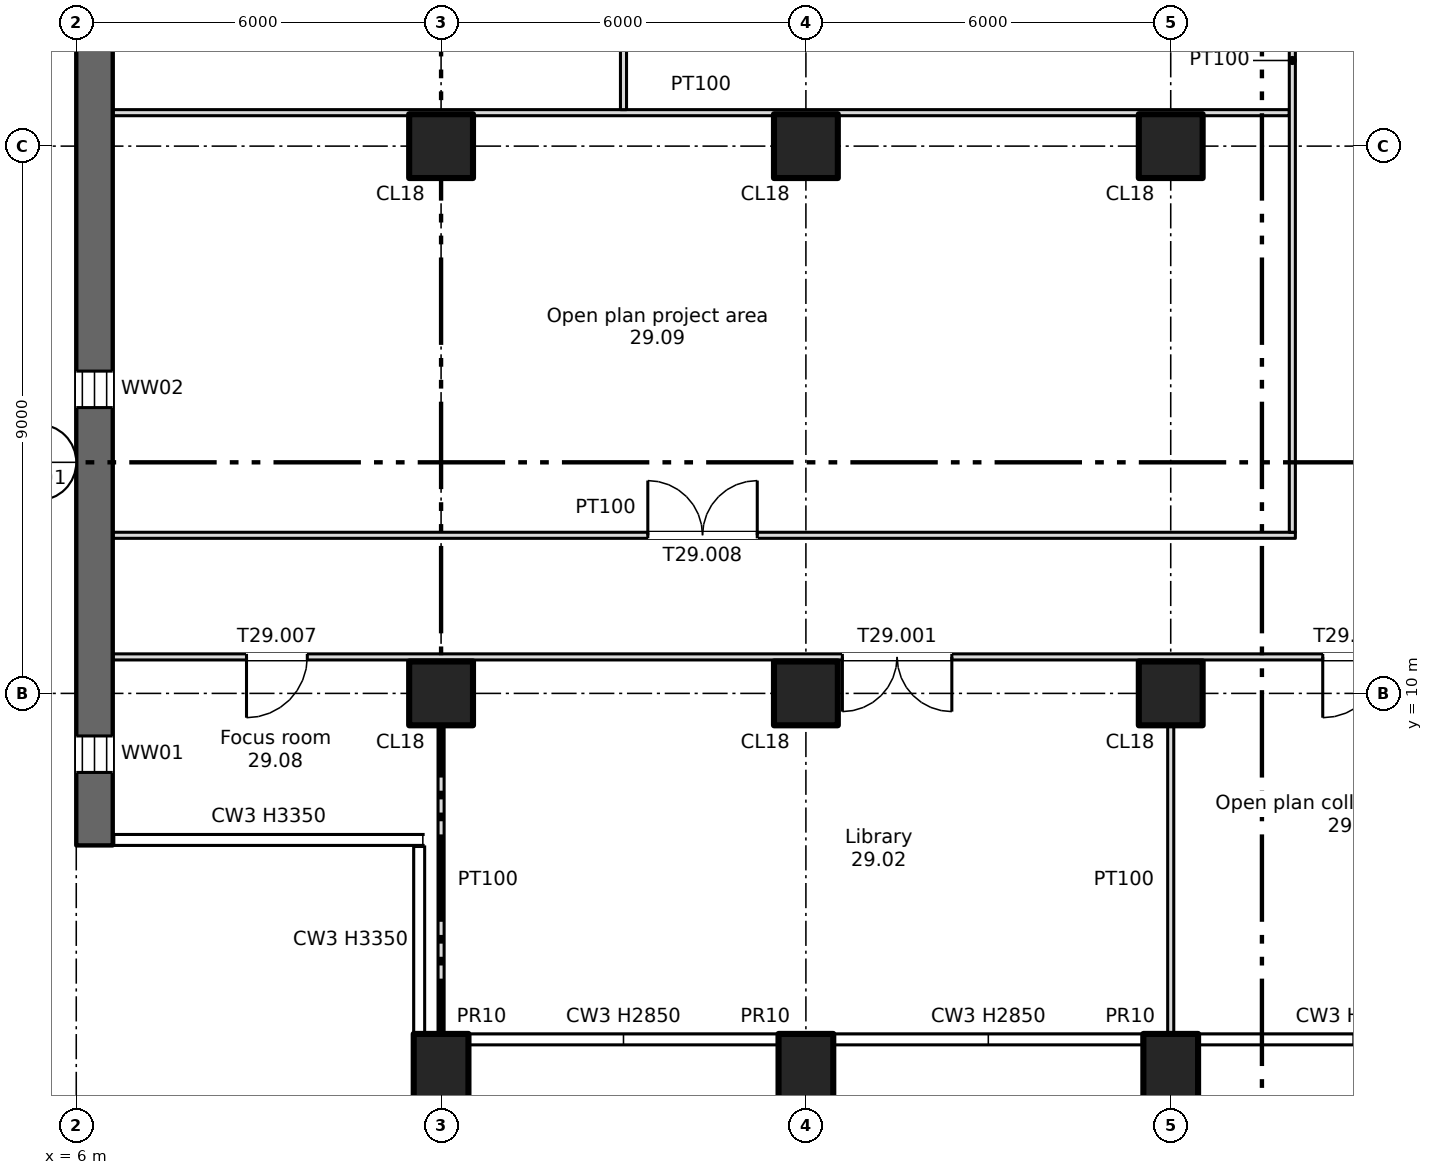
"""IFC4 building model, lengths in metres.
Left out: names, types, materials, properties, quantities, classifications, styles, units other than length and angle.
Written with IfcOpenShell. Run it as: python <this file> out.ifc"""

import sys

from ifc_helpers import new_model, si_unit, direction, frame, frame_2d, origin, origin_2d, place, context, subcontext, project, spatial, rectangle, extrude, element, fill, save


model = new_model("IFC4")
c1 = context("Model", 3, precision=1e-05, world=origin(), true_north=direction((0.0, 1.0)))
c2 = subcontext(c1, "Body", "Model", "MODEL_VIEW")
j1 = project(units=[si_unit("LENGTHUNIT", "METRE"), si_unit("PLANEANGLEUNIT", "RADIAN")], contexts=[c1])
p1 = place(None, origin())
s1 = spatial("IfcSite", under=j1, at=p1, CompositionType="ELEMENT")
p2 = place(p1, origin())
s2 = spatial("IfcBuilding", under=s1, at=p2, CompositionType="ELEMENT")
p3 = place(p2, frame((0.0, 0.0, 200.5)))
s3 = spatial("IfcBuildingStorey", under=s2, at=p3, CompositionType="ELEMENT", Elevation=200.5)
for number, where, z_axis, x_axis in (
    (1, (12.0, 3.7, -0.4), (0.0, 0.0, 1.0), (1.0, 0.0, 0.0)),
    (2, (18.0, 3.7, -0.4), (0.0, 0.0, 1.0), (1.0, 0.0, 0.0)),
    (3, (24.0, 3.7, -0.4), (0.0, 0.0, 1.0), (1.0, 0.0, 0.0)),
):
    element("IfcColumn", number, at=place(p3, frame(where, z_axis=z_axis, x_axis=x_axis)), inside=s3, PredefinedType="COLUMN", context=c2, shape_type="SweptSolid", body=[
        extrude(rectangle(XDim=0.9, YDim=1.4, at=origin_2d()), origin(), (0.0, 0.0, 1.0), 3.75),
    ])
for number, where, z_axis, x_axis in (
    (4, (12.0, 10.0, 0.0), (0.0, 0.0, 1.0), (1.0, 0.0, 0.0)),
    (5, (12.0, 19.0, 0.0), (0.0, 0.0, 1.0), (1.0, 0.0, 0.0)),
    (6, (18.0, 10.0, 0.0), (0.0, 0.0, 1.0), (1.0, 0.0, 0.0)),
    (7, (18.0, 19.0, 0.0), (0.0, 0.0, 1.0), (1.0, 0.0, 0.0)),
    (8, (24.0, 10.0, 0.0), (0.0, 0.0, 1.0), (1.0, 0.0, 0.0)),
    (9, (24.0, 19.0, 0.0), (0.0, 0.0, 1.0), (1.0, 0.0, 0.0)),
):
    element("IfcColumn", number, at=place(p3, frame(where, z_axis=z_axis, x_axis=x_axis)), inside=s3, PredefinedType="COLUMN", context=c2, shape_type="SweptSolid", body=[
        extrude(rectangle(XDim=1.05, YDim=1.05, at=origin_2d()), origin(), (0.0, 0.0, 1.0), 3.35),
    ])
p4 = place(p3, frame((6.3, 7.5, 0.0), z_axis=(0.0, 0.0, 1.0), x_axis=(0.0, 1.0, 0.0)))
e10 = element("IfcWall", 10, at=p4, inside=s3, PredefinedType="SHEAR", context=c2, shape_type="SweptSolid", body=[
    extrude(rectangle(XDim=34.0, YDim=0.6, at=frame_2d((17.0, 0.0))), origin(), (0.0, 0.0, 1.0), 3.35),
])
p5 = place(p4, frame((1.2, 0.0, 0.6)))
e11 = element("IfcOpeningElement", 11, at=p5, cuts=e10, PredefinedType="OPENING", context=c2, shape_type="SweptSolid", body=[
    extrude(rectangle(XDim=0.6, YDim=2.4, at=frame_2d((0.3, 1.2))), frame((0.0, 0.31, 0.0), z_axis=(0.0, -1.0, 0.0), x_axis=(1.0, 0.0, 0.0)), (0.0, 0.0, 1.0), 0.62),
])
p6 = place(p4, frame((7.2, 0.0, 0.6)))
e12 = element("IfcOpeningElement", 12, at=p6, cuts=e10, PredefinedType="OPENING", context=c2, shape_type="SweptSolid", body=[
    extrude(rectangle(XDim=0.6, YDim=2.4, at=frame_2d((0.3, 1.2))), frame((0.0, 0.31, 0.0), z_axis=(0.0, -1.0, 0.0), x_axis=(1.0, 0.0, 0.0)), (0.0, 0.0, 1.0), 0.62),
])
p7 = place(p4, frame((13.2, 0.0, 0.6)))
e13 = element("IfcOpeningElement", 13, at=p7, cuts=e10, PredefinedType="OPENING", context=c2, shape_type="SweptSolid", body=[
    extrude(rectangle(XDim=0.6, YDim=2.4, at=frame_2d((0.3, 1.2))), frame((0.0, 0.31, 0.0), z_axis=(0.0, -1.0, 0.0), x_axis=(1.0, 0.0, 0.0)), (0.0, 0.0, 1.0), 0.62),
])
p8 = place(p4, frame((19.2, 0.0, 0.6)))
e14 = element("IfcOpeningElement", 14, at=p8, cuts=e10, PredefinedType="OPENING", context=c2, shape_type="SweptSolid", body=[
    extrude(rectangle(XDim=0.6, YDim=2.4, at=frame_2d((0.3, 1.2))), frame((0.0, 0.31, 0.0), z_axis=(0.0, -1.0, 0.0), x_axis=(1.0, 0.0, 0.0)), (0.0, 0.0, 1.0), 0.62),
])
p9 = place(p3, frame((6.6, 10.6, 0.0), z_axis=(0.0, 0.0, 1.0), x_axis=(1.0, 0.0, 0.0)))
e15 = element("IfcWall", 15, at=p9, inside=s3, PredefinedType="PARTITIONING", context=c2, shape_type="SweptSolid", body=[
    extrude(rectangle(XDim=64.8, YDim=0.1, at=frame_2d((32.4, 0.0))), origin(), (0.0, 0.0, 1.0), 3.35),
])
p10 = place(p9, frame((12.0, 0.0, 0.0)))
e16 = element("IfcOpeningElement", 16, at=p10, cuts=e15, PredefinedType="OPENING", context=c2, shape_type="SweptSolid", body=[
    extrude(rectangle(XDim=1.8, YDim=2.1, at=frame_2d((0.9, 1.05))), frame((0.0, 0.06, 0.0), z_axis=(0.0, -1.0, 0.0), x_axis=(1.0, 0.0, 0.0)), (0.0, 0.0, 1.0), 0.12),
])
p11 = place(p9, frame((19.9, 0.0, 0.0)))
e17 = element("IfcOpeningElement", 17, at=p11, cuts=e15, PredefinedType="OPENING", context=c2, shape_type="SweptSolid", body=[
    extrude(rectangle(XDim=1.0, YDim=2.1, at=frame_2d((0.5, 1.05))), frame((0.0, 0.06, 0.0), z_axis=(0.0, -1.0, 0.0), x_axis=(1.0, 0.0, 0.0)), (0.0, 0.0, 1.0), 0.12),
])
p12 = place(p9, frame((30.0, 0.0, 0.0)))
e18 = element("IfcOpeningElement", 18, at=p12, cuts=e15, PredefinedType="OPENING", context=c2, shape_type="SweptSolid", body=[
    extrude(rectangle(XDim=1.8, YDim=2.1, at=frame_2d((0.9, 1.05))), frame((0.0, 0.06, 0.0), z_axis=(0.0, -1.0, 0.0), x_axis=(1.0, 0.0, 0.0)), (0.0, 0.0, 1.0), 0.12),
])
p13 = place(p9, frame((42.0, 0.0, 0.0)))
e19 = element("IfcOpeningElement", 19, at=p13, cuts=e15, PredefinedType="OPENING", context=c2, shape_type="SweptSolid", body=[
    extrude(rectangle(XDim=1.8, YDim=2.1, at=frame_2d((0.9, 1.05))), frame((0.0, 0.06, 0.0), z_axis=(0.0, -1.0, 0.0), x_axis=(1.0, 0.0, 0.0)), (0.0, 0.0, 1.0), 0.12),
])
p14 = place(p9, frame((51.4, 0.0, 0.0)))
e20 = element("IfcOpeningElement", 20, at=p14, cuts=e15, PredefinedType="OPENING", context=c2, shape_type="SweptSolid", body=[
    extrude(rectangle(XDim=1.0, YDim=2.1, at=frame_2d((0.5, 1.05))), frame((0.0, 0.06, 0.0), z_axis=(0.0, -1.0, 0.0), x_axis=(1.0, 0.0, 0.0)), (0.0, 0.0, 1.0), 0.12),
])
p15 = place(p9, frame((60.1, 0.0, 0.0)))
e21 = element("IfcOpeningElement", 21, at=p15, cuts=e15, PredefinedType="OPENING", context=c2, shape_type="SweptSolid", body=[
    extrude(rectangle(XDim=1.0, YDim=2.1, at=frame_2d((0.5, 1.05))), frame((0.0, 0.06, 0.0), z_axis=(0.0, -1.0, 0.0), x_axis=(1.0, 0.0, 0.0)), (0.0, 0.0, 1.0), 0.12),
])
p16 = place(p9, frame((2.2, 0.0, 0.0)))
e22 = element("IfcOpeningElement", 22, at=p16, cuts=e15, PredefinedType="OPENING", context=c2, shape_type="SweptSolid", body=[
    extrude(rectangle(XDim=1.0, YDim=2.1, at=frame_2d((0.5, 1.05))), frame((0.0, 0.06, 0.0), z_axis=(0.0, -1.0, 0.0), x_axis=(1.0, 0.0, 0.0)), (0.0, 0.0, 1.0), 0.12),
])
p17 = place(p3, frame((6.6, 12.6, 0.0), z_axis=(0.0, 0.0, 1.0), x_axis=(1.0, 0.0, 0.0)))
e23 = element("IfcWall", 23, at=p17, inside=s3, PredefinedType="PARTITIONING", context=c2, shape_type="SweptSolid", body=[
    extrude(rectangle(XDim=19.45, YDim=0.1, at=frame_2d((9.725, 0.0))), origin(), (0.0, 0.0, 1.0), 3.35),
])
p18 = place(p17, frame((8.8, 0.0, 0.0)))
e24 = element("IfcOpeningElement", 24, at=p18, cuts=e23, PredefinedType="OPENING", context=c2, shape_type="SweptSolid", body=[
    extrude(rectangle(XDim=1.8, YDim=2.1, at=frame_2d((0.9, 1.05))), frame((0.0, 0.06, 0.0), z_axis=(0.0, -1.0, 0.0), x_axis=(1.0, 0.0, 0.0)), (0.0, 0.0, 1.0), 0.12),
])
p19 = place(p3, frame((6.6, 19.55, 0.0), z_axis=(0.0, 0.0, 1.0), x_axis=(1.0, 0.0, 0.0)))
e25 = element("IfcWall", 25, at=p19, inside=s3, PredefinedType="PARTITIONING", context=c2, shape_type="SweptSolid", body=[
    extrude(rectangle(XDim=19.35, YDim=0.1, at=frame_2d((9.675, 0.0))), origin(), (0.0, 0.0, 1.0), 3.35),
])
p20 = place(p3, frame((12.0, 4.4, 0.0), z_axis=(0.0, 0.0, 1.0), x_axis=(0.0, 1.0, 0.0)))
e26 = element("IfcWall", 26, at=p20, inside=s3, PredefinedType="PARTITIONING", context=c2, shape_type="SweptSolid", body=[
    extrude(rectangle(XDim=5.075, YDim=0.1, at=frame_2d((2.538, 0.0))), origin(), (0.0, 0.0, 1.0), 3.35),
])
p21 = place(p3, frame((15.0, 19.6, 0.0), z_axis=(0.0, 0.0, 1.0), x_axis=(0.0, 1.0, 0.0)))
e27 = element("IfcWall", 27, at=p21, inside=s3, PredefinedType="PARTITIONING", context=c2, shape_type="SweptSolid", body=[
    extrude(rectangle(XDim=6.35, YDim=0.1, at=frame_2d((3.175, 0.0))), origin(), (0.0, 0.0, 1.0), 3.35),
])
p22 = place(p3, frame((24.0, 4.4, 0.0), z_axis=(0.0, 0.0, 1.0), x_axis=(0.0, 1.0, 0.0)))
e28 = element("IfcWall", 28, at=p22, inside=s3, PredefinedType="PARTITIONING", context=c2, shape_type="SweptSolid", body=[
    extrude(rectangle(XDim=5.075, YDim=0.1, at=frame_2d((2.538, 0.0))), origin(), (0.0, 0.0, 1.0), 3.35),
])
p23 = place(p3, frame((26.0, 12.65, 0.0), z_axis=(0.0, 0.0, 1.0), x_axis=(0.0, 1.0, 0.0)))
e29 = element("IfcWall", 29, at=p23, inside=s3, PredefinedType="PARTITIONING", context=c2, shape_type="SweptSolid", body=[
    extrude(rectangle(XDim=13.3, YDim=0.1, at=frame_2d((6.65, 0.0))), origin(), (0.0, 0.0, 1.0), 3.35),
])
p24 = place(p5, origin())
e30 = element("IfcWindow", 30, at=p24, inside=s3, PartitioningType="SINGLE_PANEL", PredefinedType="WINDOW", context=c2, shape_type="SweptSolid", body=[
    extrude(rectangle(XDim=0.6, YDim=2.4, at=frame_2d((0.3, 1.2))), frame((0.0, 0.03, 0.0), z_axis=(0.0, -1.0, 0.0), x_axis=(1.0, 0.0, 0.0)), (0.0, 0.0, 1.0), 0.06),
])
fill(e11, e30)
p25 = place(p6, origin())
e31 = element("IfcWindow", 31, at=p25, inside=s3, PartitioningType="SINGLE_PANEL", PredefinedType="WINDOW", context=c2, shape_type="SweptSolid", body=[
    extrude(rectangle(XDim=0.6, YDim=2.4, at=frame_2d((0.3, 1.2))), frame((0.0, 0.03, 0.0), z_axis=(0.0, -1.0, 0.0), x_axis=(1.0, 0.0, 0.0)), (0.0, 0.0, 1.0), 0.06),
])
fill(e12, e31)
p26 = place(p10, origin())
e32 = element("IfcDoor", 32, at=p26, inside=s3, OperationType="DOUBLE_DOOR_SINGLE_SWING", PredefinedType="DOOR", context=c2, shape_type="SweptSolid", body=[
    extrude(rectangle(XDim=1.8, YDim=2.1, at=frame_2d((0.9, 1.05))), frame((0.0, 0.025, 0.0), z_axis=(0.0, -1.0, 0.0), x_axis=(1.0, 0.0, 0.0)), (0.0, 0.0, 1.0), 0.05),
])
fill(e16, e32)
p27 = place(p11, origin())
e33 = element("IfcDoor", 33, at=p27, inside=s3, OperationType="SINGLE_SWING_LEFT", PredefinedType="DOOR", context=c2, shape_type="SweptSolid", body=[
    extrude(rectangle(XDim=1.0, YDim=2.1, at=frame_2d((0.5, 1.05))), frame((0.0, 0.025, 0.0), z_axis=(0.0, -1.0, 0.0), x_axis=(1.0, 0.0, 0.0)), (0.0, 0.0, 1.0), 0.05),
])
fill(e17, e33)
p28 = place(p16, origin())
e34 = element("IfcDoor", 34, at=p28, inside=s3, OperationType="SINGLE_SWING_LEFT", PredefinedType="DOOR", context=c2, shape_type="SweptSolid", body=[
    extrude(rectangle(XDim=1.0, YDim=2.1, at=frame_2d((0.5, 1.05))), frame((0.0, 0.025, 0.0), z_axis=(0.0, -1.0, 0.0), x_axis=(1.0, 0.0, 0.0)), (0.0, 0.0, 1.0), 0.05),
])
fill(e22, e34)
p29 = place(p18, origin())
e35 = element("IfcDoor", 35, at=p29, inside=s3, OperationType="DOUBLE_DOOR_SINGLE_SWING", PredefinedType="DOOR", context=c2, shape_type="SweptSolid", body=[
    extrude(rectangle(XDim=1.8, YDim=2.1, at=frame_2d((0.9, 1.05))), frame((0.0, 0.025, 0.0), z_axis=(0.0, -1.0, 0.0), x_axis=(1.0, 0.0, 0.0)), (0.0, 0.0, 1.0), 0.05),
])
fill(e24, e35)
save(model, sys.argv[1])
